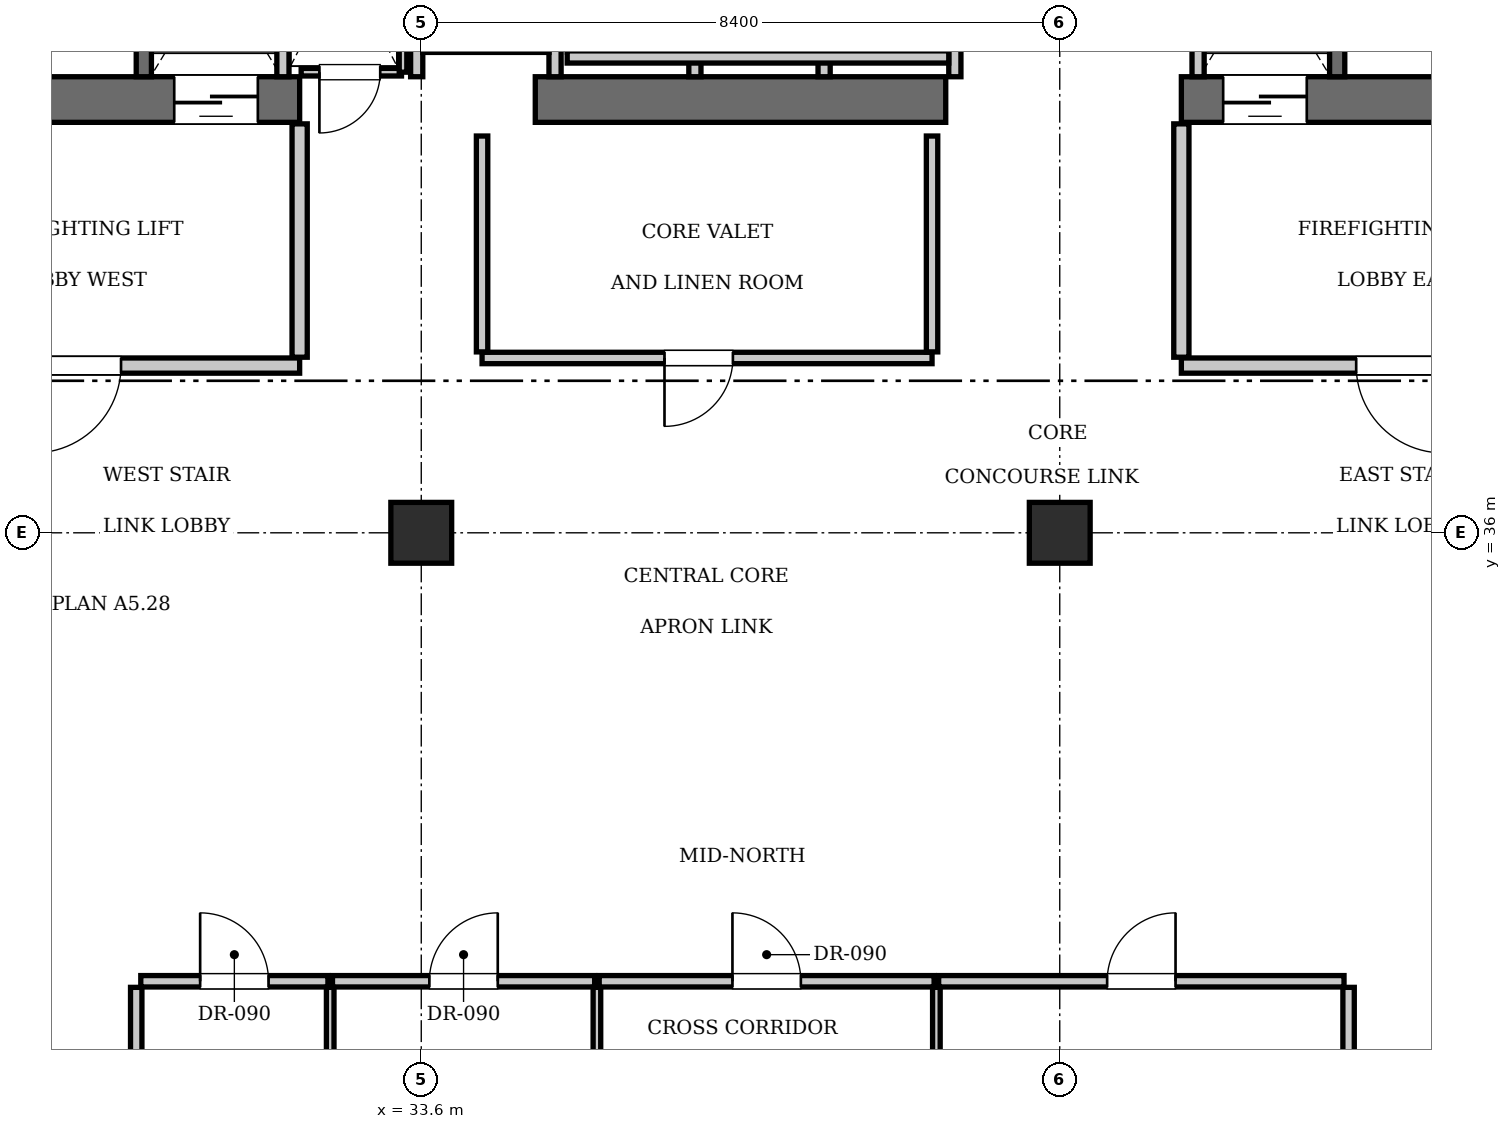
"""IFC4 building model, lengths in metres.
Left out: names, types, materials, properties, quantities, classifications, styles, units other than length and angle.
Written with IfcOpenShell. Run it as: python <this file> out.ifc"""

import sys

from ifc_helpers import new_model, si_unit, direction, frame, frame_2d, origin, origin_2d, place, context, subcontext, project, spatial, rectangle, extrude, element, fill, save


model = new_model("IFC4")
c1 = context("Model", 3, precision=1e-05, world=origin(), true_north=direction((0.0, 1.0)))
c2 = subcontext(c1, "Body", "Model", "MODEL_VIEW")
j1 = project(units=[si_unit("LENGTHUNIT", "METRE"), si_unit("PLANEANGLEUNIT", "RADIAN")], contexts=[c1])
p1 = place(None, origin())
s1 = spatial("IfcSite", under=j1, at=p1, CompositionType="ELEMENT")
p2 = place(p1, origin())
s2 = spatial("IfcBuilding", under=s1, at=p2, CompositionType="ELEMENT")
p3 = place(p2, frame((0.0, 0.0, 293.3)))
s3 = spatial("IfcBuildingStorey", under=s2, at=p3, CompositionType="ELEMENT", Elevation=293.3)
p4 = place(p3, frame((25.2, 41.7, 0.0), z_axis=(0.0, 0.0, 1.0), x_axis=(1.0, 0.0, 0.0)))
e1 = element("IfcWall", 1, at=p4, inside=s3, PredefinedType="SHEAR", context=c2, shape_type="SweptSolid", body=[
    extrude(rectangle(XDim=6.8, YDim=0.6, at=frame_2d((3.4, 0.0))), origin(), (0.0, 0.0, 1.0), 3.85),
])
p5 = place(p4, frame((1.65, 0.0, 0.0)))
e2 = element("IfcOpeningElement", 2, at=p5, cuts=e1, PredefinedType="OPENING", context=c2, shape_type="SweptSolid", body=[
    extrude(rectangle(XDim=1.15, YDim=2.15, at=frame_2d((0.575, 1.075))), frame((0.0, 0.31, 0.0), z_axis=(0.0, -1.0, 0.0), x_axis=(1.0, 0.0, 0.0)), (0.0, 0.0, 1.0), 0.62),
])
p6 = place(p4, frame((5.15, 0.0, 0.0)))
e3 = element("IfcOpeningElement", 3, at=p6, cuts=e1, PredefinedType="OPENING", context=c2, shape_type="SweptSolid", body=[
    extrude(rectangle(XDim=1.1, YDim=2.2, at=frame_2d((0.55, 1.1))), frame((0.0, 0.31, 0.0), z_axis=(0.0, -1.0, 0.0), x_axis=(1.0, 0.0, 0.0)), (0.0, 0.0, 1.0), 0.62),
])
p7 = place(p3, frame((35.1, 41.7, 0.0), z_axis=(0.0, 0.0, 1.0), x_axis=(1.0, 0.0, 0.0)))
e4 = element("IfcWall", 4, at=p7, inside=s3, PredefinedType="SHEAR", context=c2, shape_type="SweptSolid", body=[
    extrude(rectangle(XDim=5.4, YDim=0.6, at=frame_2d((2.7, 0.0))), origin(), (0.0, 0.0, 1.0), 3.85),
])
p8 = place(p3, frame((43.6, 41.7, 0.0), z_axis=(0.0, 0.0, 1.0), x_axis=(1.0, 0.0, 0.0)))
e5 = element("IfcWall", 5, at=p8, inside=s3, PredefinedType="SHEAR", context=c2, shape_type="SweptSolid", body=[
    extrude(rectangle(XDim=6.8, YDim=0.6, at=frame_2d((3.4, 0.0))), origin(), (0.0, 0.0, 1.0), 3.85),
])
p9 = place(p8, frame((3.9, 0.0, 0.0)))
e6 = element("IfcOpeningElement", 6, at=p9, cuts=e5, PredefinedType="OPENING", context=c2, shape_type="SweptSolid", body=[
    extrude(rectangle(XDim=1.15, YDim=2.15, at=frame_2d((0.575, 1.075))), frame((0.0, 0.31, 0.0), z_axis=(0.0, -1.0, 0.0), x_axis=(1.0, 0.0, 0.0)), (0.0, 0.0, 1.0), 0.62),
])
p10 = place(p8, frame((0.55, 0.0, 0.0)))
e7 = element("IfcOpeningElement", 7, at=p10, cuts=e5, PredefinedType="OPENING", context=c2, shape_type="SweptSolid", body=[
    extrude(rectangle(XDim=1.1, YDim=2.2, at=frame_2d((0.55, 1.1))), frame((0.0, 0.31, 0.0), z_axis=(0.0, -1.0, 0.0), x_axis=(1.0, 0.0, 0.0)), (0.0, 0.0, 1.0), 0.62),
])
for number, where, z_axis, x_axis in (
    (8, (33.6, 36.0, 0.0), (0.0, 0.0, 1.0), (1.0, 0.0, 0.0)),
    (9, (42.0, 36.0, 0.0), (0.0, 0.0, 1.0), (1.0, 0.0, 0.0)),
):
    element("IfcColumn", number, at=place(p3, frame(where, z_axis=z_axis, x_axis=x_axis)), inside=s3, PredefinedType="COLUMN", context=c2, shape_type="SweptSolid", body=[
        extrude(rectangle(XDim=0.8, YDim=0.8, at=origin_2d()), origin(), (0.0, 0.0, 1.0), 3.85),
    ])
for number, where, z_axis, x_axis in (
    (10, (29.95, 42.0, 0.0), (0.0, 0.0, 1.0), (0.0, 1.0, 0.0)),
    (11, (45.65, 42.0, 0.0), (0.0, 0.0, 1.0), (0.0, 1.0, 0.0)),
):
    element("IfcWall", number, at=place(p3, frame(where, z_axis=z_axis, x_axis=x_axis)), inside=s3, PredefinedType="SOLIDWALL", context=c2, shape_type="SweptSolid", body=[
        extrude(rectangle(XDim=9.15, YDim=0.2, at=frame_2d((4.575, 0.0))), origin(), (0.0, 0.0, 1.0), 3.61),
    ])
for number, where, z_axis, x_axis in (
    (12, (31.78, 42.0, 0.0), (0.0, 0.0, 1.0), (0.0, 1.0, 0.0)),
    (13, (43.82, 42.0, 0.0), (0.0, 0.0, 1.0), (0.0, 1.0, 0.0)),
):
    element("IfcWall", number, at=place(p3, frame(where, z_axis=z_axis, x_axis=x_axis)), inside=s3, PredefinedType="SOLIDWALL", context=c2, shape_type="SweptSolid", body=[
        extrude(rectangle(XDim=2.74, YDim=0.16, at=frame_2d((1.37, 0.0))), origin(), (0.0, 0.0, 1.0), 3.61),
    ])
for number, where, z_axis, x_axis in (
    (14, (37.2, 42.0, 0.0), (0.0, 0.0, 1.0), (0.0, 1.0, 0.0)),
    (15, (38.9, 42.0, 0.0), (0.0, 0.0, 1.0), (0.0, 1.0, 0.0)),
    (16, (40.62, 42.0, 0.0), (0.0, 0.0, 1.0), (0.0, 1.0, 0.0)),
):
    element("IfcWall", number, at=place(p3, frame(where, z_axis=z_axis, x_axis=x_axis)), inside=s3, PredefinedType="SOLIDWALL", context=c2, shape_type="SweptSolid", body=[
        extrude(rectangle(XDim=2.35, YDim=0.16, at=frame_2d((1.175, 0.0))), origin(), (0.0, 0.0, 1.0), 3.61),
    ])
p11 = place(p3, frame((35.52, 42.26, 0.0), z_axis=(0.0, 0.0, 1.0), x_axis=(1.0, 0.0, 0.0)))
e17 = element("IfcWall", 17, at=p11, inside=s3, PredefinedType="SOLIDWALL", context=c2, shape_type="SweptSolid", body=[
    extrude(rectangle(XDim=5.02, YDim=0.16, at=frame_2d((2.51, 0.0))), origin(), (0.0, 0.0, 1.0), 3.61),
])
for number, where, z_axis, x_axis in (
    (18, (33.54, 42.0, 0.0), (0.0, 0.0, 1.0), (0.0, 1.0, 0.0)),
    (19, (35.36, 42.0, 0.0), (0.0, 0.0, 1.0), (0.0, 1.0, 0.0)),
):
    element("IfcWall", number, at=place(p3, frame(where, z_axis=z_axis, x_axis=x_axis)), inside=s3, PredefinedType="SOLIDWALL", context=c2, shape_type="SweptSolid", body=[
        extrude(rectangle(XDim=2.4, YDim=0.16, at=frame_2d((1.2, 0.0))), origin(), (0.0, 0.0, 1.0), 3.61),
    ])
p12 = place(p3, frame((33.62, 42.4, 0.0), z_axis=(0.0, 0.0, 1.0), x_axis=(1.0, 0.0, 0.0)))
e20 = element("IfcWall", 20, at=p12, inside=s3, PredefinedType="SOLIDWALL", context=c2, shape_type="SweptSolid", body=[
    extrude(rectangle(XDim=1.66, YDim=0.16, at=frame_2d((0.83, 0.0))), origin(), (0.0, 0.0, 1.0), 3.61),
])
p13 = place(p3, frame((26.2, 38.2, 0.0), z_axis=(0.0, 0.0, 1.0), x_axis=(1.0, 0.0, 0.0)))
e21 = element("IfcWall", 21, at=p13, inside=s3, PredefinedType="PARTITIONING", context=c2, shape_type="SweptSolid", body=[
    extrude(rectangle(XDim=5.8, YDim=0.2, at=frame_2d((2.9, 0.0))), origin(), (0.0, 0.0, 1.0), 3.61),
])
p14 = place(p13, frame((2.3, 0.0, 0.0)))
e22 = element("IfcOpeningElement", 22, at=p14, cuts=e21, PredefinedType="OPENING", context=c2, shape_type="SweptSolid", body=[
    extrude(rectangle(XDim=1.15, YDim=2.15, at=frame_2d((0.575, 1.075))), frame((0.0, 0.11, 0.0), z_axis=(0.0, -1.0, 0.0), x_axis=(1.0, 0.0, 0.0)), (0.0, 0.0, 1.0), 0.22),
])
p15 = place(p3, frame((32.0, 38.31, 0.0), z_axis=(0.0, 0.0, 1.0), x_axis=(0.0, 1.0, 0.0)))
e23 = element("IfcWall", 23, at=p15, inside=s3, PredefinedType="PARTITIONING", context=c2, shape_type="SweptSolid", body=[
    extrude(rectangle(XDim=3.07, YDim=0.2, at=frame_2d((1.535, 0.0))), origin(), (0.0, 0.0, 1.0), 3.61),
])
p16 = place(p3, frame((43.6, 38.2, 0.0), z_axis=(0.0, 0.0, 1.0), x_axis=(1.0, 0.0, 0.0)))
e24 = element("IfcWall", 24, at=p16, inside=s3, PredefinedType="PARTITIONING", context=c2, shape_type="SweptSolid", body=[
    extrude(rectangle(XDim=5.8, YDim=0.2, at=frame_2d((2.9, 0.0))), origin(), (0.0, 0.0, 1.0), 3.61),
])
p17 = place(p16, frame((2.3, 0.0, 0.0)))
e25 = element("IfcOpeningElement", 25, at=p17, cuts=e24, PredefinedType="OPENING", context=c2, shape_type="SweptSolid", body=[
    extrude(rectangle(XDim=1.15, YDim=2.15, at=frame_2d((0.575, 1.075))), frame((0.0, 0.11, 0.0), z_axis=(0.0, -1.0, 0.0), x_axis=(1.0, 0.0, 0.0)), (0.0, 0.0, 1.0), 0.22),
])
p18 = place(p3, frame((43.6, 38.31, 0.0), z_axis=(0.0, 0.0, 1.0), x_axis=(0.0, 1.0, 0.0)))
e26 = element("IfcWall", 26, at=p18, inside=s3, PredefinedType="PARTITIONING", context=c2, shape_type="SweptSolid", body=[
    extrude(rectangle(XDim=3.07, YDim=0.2, at=frame_2d((1.535, 0.0))), origin(), (0.0, 0.0, 1.0), 3.61),
])
p19 = place(p3, frame((32.02, 42.06, 0.0), z_axis=(0.0, 0.0, 1.0), x_axis=(1.0, 0.0, 0.0)))
e27 = element("IfcWall", 27, at=p19, inside=s3, PredefinedType="PARTITIONING", context=c2, shape_type="SweptSolid", body=[
    extrude(rectangle(XDim=1.32, YDim=0.1, at=frame_2d((0.66, 0.0))), origin(), (0.0, 0.0, 1.0), 3.61),
])
p20 = place(p19, frame((0.24, 0.0, 0.0)))
e28 = element("IfcOpeningElement", 28, at=p20, cuts=e27, PredefinedType="OPENING", context=c2, shape_type="SweptSolid", body=[
    extrude(rectangle(XDim=0.8, YDim=2.05, at=frame_2d((0.4, 1.025))), frame((0.0, 0.06, 0.0), z_axis=(0.0, -1.0, 0.0), x_axis=(1.0, 0.0, 0.0)), (0.0, 0.0, 1.0), 0.12),
])
p21 = place(p3, frame((33.36, 42.06, 0.0), z_axis=(0.0, 0.0, 1.0), x_axis=(0.0, 1.0, 0.0)))
e29 = element("IfcWall", 29, at=p21, inside=s3, PredefinedType="PARTITIONING", context=c2, shape_type="SweptSolid", body=[
    extrude(rectangle(XDim=2.88, YDim=0.1, at=frame_2d((1.44, 0.0))), origin(), (0.0, 0.0, 1.0), 3.61),
])
p22 = place(p3, frame((34.4, 38.3, 0.0), z_axis=(0.0, 0.0, 1.0), x_axis=(1.0, 0.0, 0.0)))
e30 = element("IfcWall", 30, at=p22, inside=s3, PredefinedType="PARTITIONING", context=c2, shape_type="SweptSolid", body=[
    extrude(rectangle(XDim=5.92, YDim=0.15, at=frame_2d((2.96, 0.0))), origin(), (0.0, 0.0, 1.0), 3.61),
])
p23 = place(p22, frame((2.4, 0.0, 0.0)))
e31 = element("IfcOpeningElement", 31, at=p23, cuts=e30, PredefinedType="OPENING", context=c2, shape_type="SweptSolid", body=[
    extrude(rectangle(XDim=0.9, YDim=2.1, at=frame_2d((0.45, 1.05))), frame((0.0, 0.085, 0.0), z_axis=(0.0, -1.0, 0.0), x_axis=(1.0, 0.0, 0.0)), (0.0, 0.0, 1.0), 0.17),
])
for number, where, z_axis, x_axis in (
    (32, (34.4, 38.38, 0.0), (0.0, 0.0, 1.0), (0.0, 1.0, 0.0)),
    (33, (40.32, 38.38, 0.0), (0.0, 0.0, 1.0), (0.0, 1.0, 0.0)),
):
    element("IfcWall", number, at=place(p3, frame(where, z_axis=z_axis, x_axis=x_axis)), inside=s3, PredefinedType="PARTITIONING", context=c2, shape_type="SweptSolid", body=[
        extrude(rectangle(XDim=2.84, YDim=0.15, at=frame_2d((1.42, 0.0))), origin(), (0.0, 0.0, 1.0), 3.61),
    ])
for number, where, z_axis, x_axis in (
    (34, (29.85, 22.33, 0.0), (0.0, 0.0, 1.0), (0.0, 1.0, 0.0)),
    (35, (45.8, 22.33, 0.0), (0.0, 0.0, 1.0), (0.0, 1.0, 0.0)),
):
    element("IfcWall", number, at=place(p3, frame(where, z_axis=z_axis, x_axis=x_axis)), inside=s3, PredefinedType="PARTITIONING", context=c2, shape_type="SweptSolid", body=[
        extrude(rectangle(XDim=7.69, YDim=0.15, at=frame_2d((3.845, 0.0))), origin(), (0.0, 0.0, 1.0), 3.61),
    ])
p24 = place(p3, frame((29.91, 30.1, 0.0), z_axis=(0.0, 0.0, 1.0), x_axis=(1.0, 0.0, 0.0)))
e36 = element("IfcWall", 36, at=p24, inside=s3, PredefinedType="PARTITIONING", context=c2, shape_type="SweptSolid", body=[
    extrude(rectangle(XDim=2.462, YDim=0.15, at=frame_2d((1.231, 0.0))), origin(), (0.0, 0.0, 1.0), 3.61),
])
p25 = place(p24, frame((0.781, 0.0, 0.0)))
e37 = element("IfcOpeningElement", 37, at=p25, cuts=e36, PredefinedType="OPENING", context=c2, shape_type="SweptSolid", body=[
    extrude(rectangle(XDim=0.9, YDim=2.1, at=frame_2d((0.45, 1.05))), frame((0.0, 0.085, 0.0), z_axis=(0.0, -1.0, 0.0), x_axis=(1.0, 0.0, 0.0)), (0.0, 0.0, 1.0), 0.17),
])
p26 = place(p3, frame((32.402, 22.33, 0.0), z_axis=(0.0, 0.0, 1.0), x_axis=(0.0, 1.0, 0.0)))
e38 = element("IfcWall", 38, at=p26, inside=s3, PredefinedType="PARTITIONING", context=c2, shape_type="SweptSolid", body=[
    extrude(rectangle(XDim=7.69, YDim=0.1, at=frame_2d((3.845, 0.0))), origin(), (0.0, 0.0, 1.0), 3.61),
])
p27 = place(p3, frame((32.432, 30.1, 0.0), z_axis=(0.0, 0.0, 1.0), x_axis=(1.0, 0.0, 0.0)))
e39 = element("IfcWall", 39, at=p27, inside=s3, PredefinedType="PARTITIONING", context=c2, shape_type="SweptSolid", body=[
    extrude(rectangle(XDim=3.449, YDim=0.15, at=frame_2d((1.725, 0.0))), origin(), (0.0, 0.0, 1.0), 3.61),
])
p28 = place(p27, frame((1.274, 0.0, 0.0)))
e40 = element("IfcOpeningElement", 40, at=p28, cuts=e39, PredefinedType="OPENING", context=c2, shape_type="SweptSolid", body=[
    extrude(rectangle(XDim=0.9, YDim=2.1, at=frame_2d((0.45, 1.05))), frame((0.0, 0.085, 0.0), z_axis=(0.0, -1.0, 0.0), x_axis=(1.0, 0.0, 0.0)), (0.0, 0.0, 1.0), 0.17),
])
p29 = place(p3, frame((35.911, 22.33, 0.0), z_axis=(0.0, 0.0, 1.0), x_axis=(0.0, 1.0, 0.0)))
e41 = element("IfcWall", 41, at=p29, inside=s3, PredefinedType="PARTITIONING", context=c2, shape_type="SweptSolid", body=[
    extrude(rectangle(XDim=7.69, YDim=0.1, at=frame_2d((3.845, 0.0))), origin(), (0.0, 0.0, 1.0), 3.61),
])
p30 = place(p3, frame((35.941, 30.1, 0.0), z_axis=(0.0, 0.0, 1.0), x_axis=(1.0, 0.0, 0.0)))
e42 = element("IfcWall", 42, at=p30, inside=s3, PredefinedType="PARTITIONING", context=c2, shape_type="SweptSolid", body=[
    extrude(rectangle(XDim=4.406, YDim=0.15, at=frame_2d((2.203, 0.0))), origin(), (0.0, 0.0, 1.0), 3.61),
])
p31 = place(p30, frame((1.753, 0.0, 0.0)))
e43 = element("IfcOpeningElement", 43, at=p31, cuts=e42, PredefinedType="OPENING", context=c2, shape_type="SweptSolid", body=[
    extrude(rectangle(XDim=0.9, YDim=2.1, at=frame_2d((0.45, 1.05))), frame((0.0, 0.085, 0.0), z_axis=(0.0, -1.0, 0.0), x_axis=(1.0, 0.0, 0.0)), (0.0, 0.0, 1.0), 0.17),
])
p32 = place(p3, frame((40.377, 22.33, 0.0), z_axis=(0.0, 0.0, 1.0), x_axis=(0.0, 1.0, 0.0)))
e44 = element("IfcWall", 44, at=p32, inside=s3, PredefinedType="PARTITIONING", context=c2, shape_type="SweptSolid", body=[
    extrude(rectangle(XDim=7.69, YDim=0.1, at=frame_2d((3.845, 0.0))), origin(), (0.0, 0.0, 1.0), 3.61),
])
p33 = place(p3, frame((40.407, 30.1, 0.0), z_axis=(0.0, 0.0, 1.0), x_axis=(1.0, 0.0, 0.0)))
e45 = element("IfcWall", 45, at=p33, inside=s3, PredefinedType="PARTITIONING", context=c2, shape_type="SweptSolid", body=[
    extrude(rectangle(XDim=5.333, YDim=0.15, at=frame_2d((2.667, 0.0))), origin(), (0.0, 0.0, 1.0), 3.61),
])
p34 = place(p33, frame((2.217, 0.0, 0.0)))
e46 = element("IfcOpeningElement", 46, at=p34, cuts=e45, PredefinedType="OPENING", context=c2, shape_type="SweptSolid", body=[
    extrude(rectangle(XDim=0.9, YDim=2.1, at=frame_2d((0.45, 1.05))), frame((0.0, 0.085, 0.0), z_axis=(0.0, -1.0, 0.0), x_axis=(1.0, 0.0, 0.0)), (0.0, 0.0, 1.0), 0.17),
])
p35 = place(p6, frame((1.1, 0.0, 0.0), z_axis=(0.0, 0.0, 1.0), x_axis=(-1.0, 0.0, 0.0)))
e47 = element("IfcDoor", 47, at=p35, inside=s3, OperationType="SLIDING_TO_LEFT", PredefinedType="DOOR", context=c2, shape_type="SweptSolid", body=[
    extrude(rectangle(XDim=1.1, YDim=2.2, at=frame_2d((0.55, 1.1))), frame((0.0, 0.025, 0.0), z_axis=(0.0, -1.0, 0.0), x_axis=(1.0, 0.0, 0.0)), (0.0, 0.0, 1.0), 0.05),
])
fill(e3, e47)
p36 = place(p10, frame((1.1, 0.0, 0.0), z_axis=(0.0, 0.0, 1.0), x_axis=(-1.0, 0.0, 0.0)))
e48 = element("IfcDoor", 48, at=p36, inside=s3, OperationType="SLIDING_TO_LEFT", PredefinedType="DOOR", context=c2, shape_type="SweptSolid", body=[
    extrude(rectangle(XDim=1.1, YDim=2.2, at=frame_2d((0.55, 1.1))), frame((0.0, 0.025, 0.0), z_axis=(0.0, -1.0, 0.0), x_axis=(1.0, 0.0, 0.0)), (0.0, 0.0, 1.0), 0.05),
])
fill(e7, e48)
p37 = place(p14, frame((1.15, 0.0, 0.0), z_axis=(0.0, 0.0, 1.0), x_axis=(-1.0, 0.0, 0.0)))
e49 = element("IfcDoor", 49, at=p37, inside=s3, OperationType="SINGLE_SWING_RIGHT", PredefinedType="DOOR", context=c2, shape_type="SweptSolid", body=[
    extrude(rectangle(XDim=1.15, YDim=2.15, at=frame_2d((0.575, 1.075))), frame((0.0, 0.025, 0.0), z_axis=(0.0, -1.0, 0.0), x_axis=(1.0, 0.0, 0.0)), (0.0, 0.0, 1.0), 0.05),
])
fill(e22, e49)
p38 = place(p17, frame((1.15, 0.0, 0.0), z_axis=(0.0, 0.0, 1.0), x_axis=(-1.0, 0.0, 0.0)))
e50 = element("IfcDoor", 50, at=p38, inside=s3, OperationType="SINGLE_SWING_LEFT", PredefinedType="DOOR", context=c2, shape_type="SweptSolid", body=[
    extrude(rectangle(XDim=1.15, YDim=2.15, at=frame_2d((0.575, 1.075))), frame((0.0, 0.025, 0.0), z_axis=(0.0, -1.0, 0.0), x_axis=(1.0, 0.0, 0.0)), (0.0, 0.0, 1.0), 0.05),
])
fill(e25, e50)
p39 = place(p20, frame((0.8, 0.0, 0.0), z_axis=(0.0, 0.0, 1.0), x_axis=(-1.0, 0.0, 0.0)))
e51 = element("IfcDoor", 51, at=p39, inside=s3, OperationType="SINGLE_SWING_RIGHT", PredefinedType="DOOR", context=c2, shape_type="SweptSolid", body=[
    extrude(rectangle(XDim=0.8, YDim=2.05, at=frame_2d((0.4, 1.025))), frame((0.0, 0.025, 0.0), z_axis=(0.0, -1.0, 0.0), x_axis=(1.0, 0.0, 0.0)), (0.0, 0.0, 1.0), 0.05),
])
fill(e28, e51)
p40 = place(p23, frame((0.9, 0.0, 0.0), z_axis=(0.0, 0.0, 1.0), x_axis=(-1.0, 0.0, 0.0)))
e52 = element("IfcDoor", 52, at=p40, inside=s3, OperationType="SINGLE_SWING_RIGHT", PredefinedType="DOOR", context=c2, shape_type="SweptSolid", body=[
    extrude(rectangle(XDim=0.9, YDim=2.1, at=frame_2d((0.45, 1.05))), frame((0.0, 0.025, 0.0), z_axis=(0.0, -1.0, 0.0), x_axis=(1.0, 0.0, 0.0)), (0.0, 0.0, 1.0), 0.05),
])
fill(e31, e52)
p41 = place(p25, origin())
e53 = element("IfcDoor", 53, at=p41, inside=s3, OperationType="SINGLE_SWING_LEFT", PredefinedType="DOOR", context=c2, shape_type="SweptSolid", body=[
    extrude(rectangle(XDim=0.9, YDim=2.1, at=frame_2d((0.45, 1.05))), frame((0.0, 0.025, 0.0), z_axis=(0.0, -1.0, 0.0), x_axis=(1.0, 0.0, 0.0)), (0.0, 0.0, 1.0), 0.05),
])
fill(e37, e53)
p42 = place(p28, origin())
e54 = element("IfcDoor", 54, at=p42, inside=s3, OperationType="SINGLE_SWING_RIGHT", PredefinedType="DOOR", context=c2, shape_type="SweptSolid", body=[
    extrude(rectangle(XDim=0.9, YDim=2.1, at=frame_2d((0.45, 1.05))), frame((0.0, 0.025, 0.0), z_axis=(0.0, -1.0, 0.0), x_axis=(1.0, 0.0, 0.0)), (0.0, 0.0, 1.0), 0.05),
])
fill(e40, e54)
p43 = place(p31, origin())
e55 = element("IfcDoor", 55, at=p43, inside=s3, OperationType="SINGLE_SWING_LEFT", PredefinedType="DOOR", context=c2, shape_type="SweptSolid", body=[
    extrude(rectangle(XDim=0.9, YDim=2.1, at=frame_2d((0.45, 1.05))), frame((0.0, 0.025, 0.0), z_axis=(0.0, -1.0, 0.0), x_axis=(1.0, 0.0, 0.0)), (0.0, 0.0, 1.0), 0.05),
])
fill(e43, e55)
p44 = place(p34, origin())
e56 = element("IfcDoor", 56, at=p44, inside=s3, OperationType="SINGLE_SWING_RIGHT", PredefinedType="DOOR", context=c2, shape_type="SweptSolid", body=[
    extrude(rectangle(XDim=0.9, YDim=2.1, at=frame_2d((0.45, 1.05))), frame((0.0, 0.025, 0.0), z_axis=(0.0, -1.0, 0.0), x_axis=(1.0, 0.0, 0.0)), (0.0, 0.0, 1.0), 0.05),
])
fill(e46, e56)
save(model, sys.argv[1])
